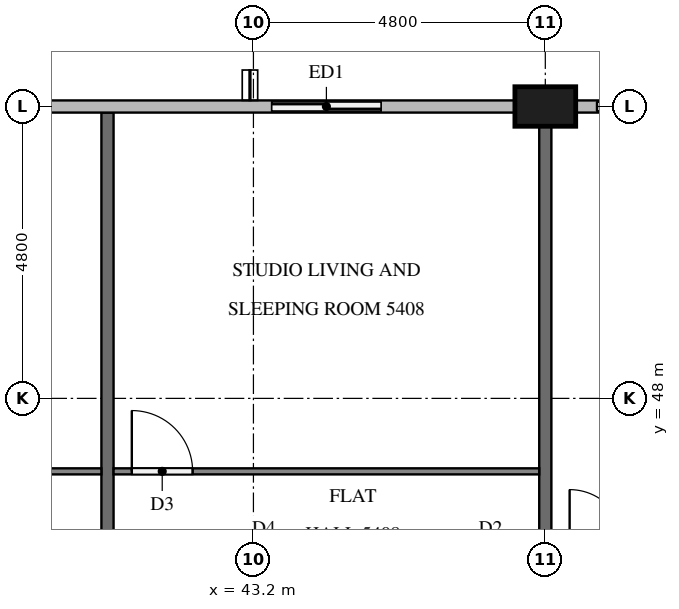
"""IFC4 building model, lengths in metres.
Left out: names, types, materials, properties, quantities, classifications, styles, units other than length and angle.
Written with IfcOpenShell. Run it as: python <this file> out.ifc"""

import sys

from ifc_helpers import new_model, si_unit, direction, frame, frame_2d, origin, origin_2d, place, context, subcontext, project, spatial, rectangle, extrude, element, fill, save


model = new_model("IFC4")
c1 = context("Model", 3, precision=1e-05, world=origin(), true_north=direction((0.0, 1.0)))
c2 = subcontext(c1, "Body", "Model", "MODEL_VIEW")
j1 = project(units=[si_unit("LENGTHUNIT", "METRE"), si_unit("PLANEANGLEUNIT", "RADIAN")], contexts=[c1])
p1 = place(None, origin())
s1 = spatial("IfcSite", under=j1, at=p1, CompositionType="ELEMENT")
p2 = place(p1, origin())
s2 = spatial("IfcBuilding", under=s1, at=p2, CompositionType="ELEMENT")
p3 = place(p2, frame((0.0, 0.0, 208.8)))
s3 = spatial("IfcBuildingStorey", under=s2, at=p3, CompositionType="ELEMENT", Elevation=208.8)
p4 = place(p3, frame((48.0, 52.8, 0.0), z_axis=(0.0, 0.0, 1.0), x_axis=(1.0, 0.0, 0.0)))
e1 = element("IfcColumn", 1, at=p4, inside=s3, PredefinedType="COLUMN", context=c2, shape_type="SweptSolid", body=[
    extrude(rectangle(XDim=1.0, YDim=0.65, at=origin_2d()), origin(), (0.0, 0.0, 1.0), 3.2),
])
p5 = place(p3, frame((50.4, 52.8, 0.0), z_axis=(0.0, 0.0, 1.0), x_axis=(-1.0, 0.0, 0.0)))
e2 = element("IfcWall", 2, at=p5, inside=s3, PredefinedType="SOLIDWALL", context=c2, shape_type="SweptSolid", body=[
    extrude(rectangle(XDim=1.9, YDim=0.15, at=frame_2d((0.95, 0.0))), origin(), (0.0, 0.0, 1.0), 3.2),
])
p6 = place(p5, frame((0.35, 0.0, 0.9)))
e3 = element("IfcOpeningElement", 3, at=p6, cuts=e2, PredefinedType="OPENING", context=c2, shape_type="SweptSolid", body=[
    extrude(rectangle(XDim=1.2, YDim=1.4, at=frame_2d((0.6, 0.7))), frame((0.0, 0.085, 0.0), z_axis=(0.0, -1.0, 0.0), x_axis=(1.0, 0.0, 0.0)), (0.0, 0.0, 1.0), 0.17),
])
p7 = place(p3, frame((45.6, 52.8, 0.0), z_axis=(0.0, 0.0, 1.0), x_axis=(-1.0, 0.0, 0.0)))
e4 = element("IfcWall", 4, at=p7, inside=s3, PredefinedType="SOLIDWALL", context=c2, shape_type="SweptSolid", body=[
    extrude(rectangle(XDim=2.4, YDim=0.15, at=frame_2d((1.2, 0.0))), origin(), (0.0, 0.0, 1.0), 3.2),
])
p8 = place(p7, frame((0.3, 0.0, 0.0)))
e5 = element("IfcOpeningElement", 5, at=p8, cuts=e4, PredefinedType="OPENING", context=c2, shape_type="SweptSolid", body=[
    extrude(rectangle(XDim=1.8, YDim=2.4, at=frame_2d((0.9, 1.2))), frame((0.0, 0.085, 0.0), z_axis=(0.0, -1.0, 0.0), x_axis=(1.0, 0.0, 0.0)), (0.0, 0.0, 1.0), 0.17),
])
p9 = place(p3, frame((48.0, 52.475, 0.0), z_axis=(0.0, 0.0, 1.0), x_axis=(0.0, -1.0, 0.0)))
e6 = element("IfcWall", 6, at=p9, inside=s3, PredefinedType="PARTITIONING", context=c2, shape_type="SweptSolid", body=[
    extrude(rectangle(XDim=11.575, YDim=0.2, at=frame_2d((5.788, 0.0))), origin(), (0.0, 0.0, 1.0), 3.2),
])
p10 = place(p3, frame((40.8, 52.7, 0.0), z_axis=(0.0, 0.0, 1.0), x_axis=(0.0, -1.0, 0.0)))
e7 = element("IfcWall", 7, at=p10, inside=s3, PredefinedType="PARTITIONING", context=c2, shape_type="SweptSolid", body=[
    extrude(rectangle(XDim=11.8, YDim=0.2, at=frame_2d((5.9, 0.0))), origin(), (0.0, 0.0, 1.0), 3.2),
])
p11 = place(p3, frame((40.9, 46.8, 0.0), z_axis=(0.0, 0.0, 1.0), x_axis=(1.0, 0.0, 0.0)))
e8 = element("IfcWall", 8, at=p11, inside=s3, PredefinedType="PARTITIONING", context=c2, shape_type="SweptSolid", body=[
    extrude(rectangle(XDim=7.0, YDim=0.1, at=frame_2d((3.5, 0.0))), origin(), (0.0, 0.0, 1.0), 3.2),
])
p12 = place(p11, frame((0.3, 0.0, 0.0)))
e9 = element("IfcOpeningElement", 9, at=p12, cuts=e8, PredefinedType="OPENING", context=c2, shape_type="SweptSolid", body=[
    extrude(rectangle(XDim=1.0, YDim=2.1, at=frame_2d((0.5, 1.05))), frame((0.0, 0.06, 0.0), z_axis=(0.0, -1.0, 0.0), x_axis=(1.0, 0.0, 0.0)), (0.0, 0.0, 1.0), 0.12),
])
p13 = place(p3, frame((24.1, 46.8, 0.0), z_axis=(0.0, 0.0, 1.0), x_axis=(1.0, 0.0, 0.0)))
e10 = element("IfcWall", 10, at=p13, inside=s3, PredefinedType="PARTITIONING", context=c2, shape_type="SweptSolid", body=[
    extrude(rectangle(XDim=16.6, YDim=0.1, at=frame_2d((8.3, 0.0))), origin(), (0.0, 0.0, 1.0), 3.2),
])
p14 = place(p13, frame((0.3, 0.0, 0.0)))
e11 = element("IfcOpeningElement", 11, at=p14, cuts=e10, PredefinedType="OPENING", context=c2, shape_type="SweptSolid", body=[
    extrude(rectangle(XDim=0.9, YDim=2.1, at=frame_2d((0.45, 1.05))), frame((0.0, 0.06, 0.0), z_axis=(0.0, -1.0, 0.0), x_axis=(1.0, 0.0, 0.0)), (0.0, 0.0, 1.0), 0.12),
])
p15 = place(p13, frame((10.55, 0.0, 0.0)))
e12 = element("IfcOpeningElement", 12, at=p15, cuts=e10, PredefinedType="OPENING", context=c2, shape_type="SweptSolid", body=[
    extrude(rectangle(XDim=1.0, YDim=2.1, at=frame_2d((0.5, 1.05))), frame((0.0, 0.06, 0.0), z_axis=(0.0, -1.0, 0.0), x_axis=(1.0, 0.0, 0.0)), (0.0, 0.0, 1.0), 0.12),
])
p16 = place(p13, frame((12.25, 0.0, 0.0)))
e13 = element("IfcOpeningElement", 13, at=p16, cuts=e10, PredefinedType="OPENING", context=c2, shape_type="SweptSolid", body=[
    extrude(rectangle(XDim=0.9, YDim=2.1, at=frame_2d((0.45, 1.05))), frame((0.0, 0.06, 0.0), z_axis=(0.0, -1.0, 0.0), x_axis=(1.0, 0.0, 0.0)), (0.0, 0.0, 1.0), 0.12),
])
p17 = place(p6, origin())
e14 = element("IfcWindow", 14, at=p17, inside=s3, PartitioningType="SINGLE_PANEL", PredefinedType="WINDOW", context=c2, shape_type="SweptSolid", body=[
    extrude(rectangle(XDim=1.2, YDim=1.4, at=frame_2d((0.6, 0.7))), frame((0.0, 0.03, 0.0), z_axis=(0.0, -1.0, 0.0), x_axis=(1.0, 0.0, 0.0)), (0.0, 0.0, 1.0), 0.06),
])
fill(e3, e14)
p18 = place(p8, origin())
e15 = element("IfcDoor", 15, at=p18, inside=s3, OperationType="SLIDING_TO_LEFT", PredefinedType="DOOR", context=c2, shape_type="SweptSolid", body=[
    extrude(rectangle(XDim=1.8, YDim=2.4, at=frame_2d((0.9, 1.2))), frame((0.0, 0.025, 0.0), z_axis=(0.0, -1.0, 0.0), x_axis=(1.0, 0.0, 0.0)), (0.0, 0.0, 1.0), 0.05),
])
fill(e5, e15)
p19 = place(p12, origin())
e16 = element("IfcDoor", 16, at=p19, inside=s3, OperationType="SINGLE_SWING_LEFT", PredefinedType="DOOR", context=c2, shape_type="SweptSolid", body=[
    extrude(rectangle(XDim=1.0, YDim=2.1, at=frame_2d((0.5, 1.05))), frame((0.0, 0.025, 0.0), z_axis=(0.0, -1.0, 0.0), x_axis=(1.0, 0.0, 0.0)), (0.0, 0.0, 1.0), 0.05),
])
fill(e9, e16)
save(model, sys.argv[1])
